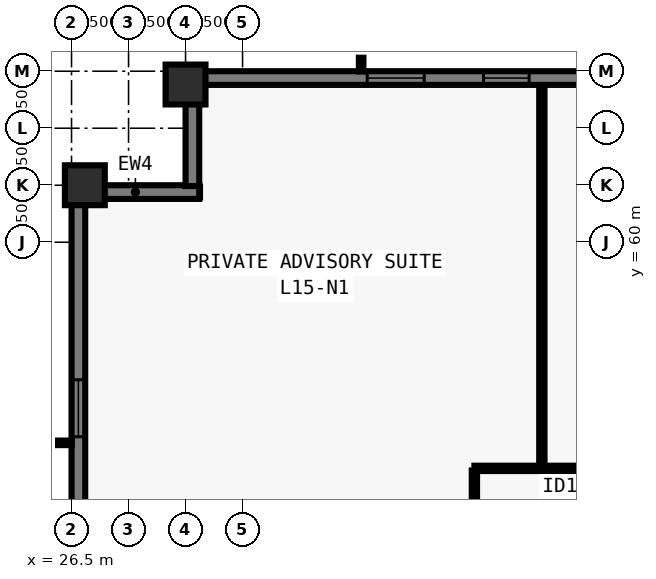
"""IFC4 building model, lengths in metres.
Left out: names, types, materials, properties, quantities, classifications, styles, units other than length and angle.
Written with IfcOpenShell. Run it as: python <this file> out.ifc"""

import sys

from ifc_helpers import new_model, si_unit, direction, frame, frame_2d, origin, origin_2d, place, context, subcontext, project, spatial, rectangle, extrude, element, fill, save


model = new_model("IFC4")
c1 = context("Model", 3, precision=1e-05, world=origin(), true_north=direction((0.0, 1.0)))
c2 = subcontext(c1, "Body", "Model", "MODEL_VIEW")
j1 = project(units=[si_unit("LENGTHUNIT", "METRE"), si_unit("PLANEANGLEUNIT", "RADIAN")], contexts=[c1])
p1 = place(None, origin())
s1 = spatial("IfcSite", under=j1, at=p1, CompositionType="ELEMENT")
p2 = place(p1, origin())
s2 = spatial("IfcBuilding", under=s1, at=p2, CompositionType="ELEMENT")
p3 = place(p2, frame((0.0, 0.0, 58.5)))
s3 = spatial("IfcBuildingStorey", under=s2, at=p3, CompositionType="ELEMENT", Elevation=58.5)
for number, where, z_axis, x_axis in (
    (1, (29.5, 64.15, 0.0), (0.0, 0.0, 1.0), (1.0, 0.0, 0.0)),
    (2, (26.85, 61.5, 0.0), (0.0, 0.0, 1.0), (0.0, 1.0, 0.0)),
):
    element("IfcColumn", number, at=place(p3, frame(where, z_axis=z_axis, x_axis=x_axis)), inside=s3, PredefinedType="COLUMN", context=c2, shape_type="SweptSolid", body=[
        extrude(rectangle(XDim=1.05, YDim=1.05, at=origin_2d()), origin(), (0.0, 0.0, 1.0), 3.5),
    ])
p4 = place(p3, frame((26.68, 16.5, 0.0), z_axis=(0.0, 0.0, 1.0), x_axis=(0.0, 1.0, 0.0)))
e3 = element("IfcWall", 3, at=p4, inside=s3, PredefinedType="SOLIDWALL", context=c2, shape_type="SweptSolid", body=[
    extrude(rectangle(XDim=44.662, YDim=0.36, at=frame_2d((22.331, 0.0))), origin(), (0.0, 0.0, 1.0), 3.28),
])
p5 = place(p4, frame((4.78, 0.0, 0.8)))
e4 = element("IfcOpeningElement", 4, at=p5, cuts=e3, PredefinedType="OPENING", context=c2, shape_type="SweptSolid", body=[
    extrude(rectangle(XDim=1.5, YDim=1.544, at=frame_2d((0.75, 0.772))), frame((0.0, 0.19, 0.0), z_axis=(0.0, -1.0, 0.0), x_axis=(1.0, 0.0, 0.0)), (0.0, 0.0, 1.0), 0.38),
])
p6 = place(p4, frame((8.29, 0.0, 0.8)))
e5 = element("IfcOpeningElement", 5, at=p6, cuts=e3, PredefinedType="OPENING", context=c2, shape_type="SweptSolid", body=[
    extrude(rectangle(XDim=1.2, YDim=1.544, at=frame_2d((0.6, 0.772))), frame((0.0, 0.19, 0.0), z_axis=(0.0, -1.0, 0.0), x_axis=(1.0, 0.0, 0.0)), (0.0, 0.0, 1.0), 0.38),
])
p7 = place(p4, frame((11.5, 0.0, 0.8)))
e6 = element("IfcOpeningElement", 6, at=p7, cuts=e3, PredefinedType="OPENING", context=c2, shape_type="SweptSolid", body=[
    extrude(rectangle(XDim=1.5, YDim=1.544, at=frame_2d((0.75, 0.772))), frame((0.0, 0.19, 0.0), z_axis=(0.0, -1.0, 0.0), x_axis=(1.0, 0.0, 0.0)), (0.0, 0.0, 1.0), 0.38),
])
p8 = place(p4, frame((15.01, 0.0, 0.8)))
e7 = element("IfcOpeningElement", 7, at=p8, cuts=e3, PredefinedType="OPENING", context=c2, shape_type="SweptSolid", body=[
    extrude(rectangle(XDim=1.2, YDim=1.544, at=frame_2d((0.6, 0.772))), frame((0.0, 0.19, 0.0), z_axis=(0.0, -1.0, 0.0), x_axis=(1.0, 0.0, 0.0)), (0.0, 0.0, 1.0), 0.38),
])
p9 = place(p4, frame((21.731, 0.0, 0.8)))
e8 = element("IfcOpeningElement", 8, at=p9, cuts=e3, PredefinedType="OPENING", context=c2, shape_type="SweptSolid", body=[
    extrude(rectangle(XDim=1.2, YDim=1.544, at=frame_2d((0.6, 0.772))), frame((0.0, 0.19, 0.0), z_axis=(0.0, -1.0, 0.0), x_axis=(1.0, 0.0, 0.0)), (0.0, 0.0, 1.0), 0.38),
])
p10 = place(p4, frame((24.091, 0.0, 0.8)))
e9 = element("IfcOpeningElement", 9, at=p10, cuts=e3, PredefinedType="OPENING", context=c2, shape_type="SweptSolid", body=[
    extrude(rectangle(XDim=1.5, YDim=1.544, at=frame_2d((0.75, 0.772))), frame((0.0, 0.19, 0.0), z_axis=(0.0, -1.0, 0.0), x_axis=(1.0, 0.0, 0.0)), (0.0, 0.0, 1.0), 0.38),
])
p11 = place(p4, frame((28.451, 0.0, 0.8)))
e10 = element("IfcOpeningElement", 10, at=p11, cuts=e3, PredefinedType="OPENING", context=c2, shape_type="SweptSolid", body=[
    extrude(rectangle(XDim=1.2, YDim=1.544, at=frame_2d((0.6, 0.772))), frame((0.0, 0.19, 0.0), z_axis=(0.0, -1.0, 0.0), x_axis=(1.0, 0.0, 0.0)), (0.0, 0.0, 1.0), 0.38),
])
p12 = place(p4, frame((31.662, 0.0, 0.8)))
e11 = element("IfcOpeningElement", 11, at=p12, cuts=e3, PredefinedType="OPENING", context=c2, shape_type="SweptSolid", body=[
    extrude(rectangle(XDim=1.5, YDim=1.544, at=frame_2d((0.75, 0.772))), frame((0.0, 0.19, 0.0), z_axis=(0.0, -1.0, 0.0), x_axis=(1.0, 0.0, 0.0)), (0.0, 0.0, 1.0), 0.38),
])
p13 = place(p4, frame((35.172, 0.0, 0.8)))
e12 = element("IfcOpeningElement", 12, at=p13, cuts=e3, PredefinedType="OPENING", context=c2, shape_type="SweptSolid", body=[
    extrude(rectangle(XDim=1.2, YDim=1.544, at=frame_2d((0.6, 0.772))), frame((0.0, 0.19, 0.0), z_axis=(0.0, -1.0, 0.0), x_axis=(1.0, 0.0, 0.0)), (0.0, 0.0, 1.0), 0.38),
])
p14 = place(p4, frame((38.382, 0.0, 0.8)))
e13 = element("IfcOpeningElement", 13, at=p14, cuts=e3, PredefinedType="OPENING", context=c2, shape_type="SweptSolid", body=[
    extrude(rectangle(XDim=1.5, YDim=1.544, at=frame_2d((0.75, 0.772))), frame((0.0, 0.19, 0.0), z_axis=(0.0, -1.0, 0.0), x_axis=(1.0, 0.0, 0.0)), (0.0, 0.0, 1.0), 0.38),
])
p15 = place(p3, frame((26.5, 61.32, 0.0), z_axis=(0.0, 0.0, 1.0), x_axis=(1.0, 0.0, 0.0)))
e14 = element("IfcWall", 14, at=p15, inside=s3, PredefinedType="SOLIDWALL", context=c2, shape_type="SweptSolid", body=[
    extrude(rectangle(XDim=3.36, YDim=0.36, at=frame_2d((1.68, 0.0))), origin(), (0.0, 0.0, 1.0), 3.28),
])
p16 = place(p3, frame((29.68, 61.478, 0.0), z_axis=(0.0, 0.0, 1.0), x_axis=(0.0, 1.0, 0.0)))
e15 = element("IfcWall", 15, at=p16, inside=s3, PredefinedType="SOLIDWALL", context=c2, shape_type="SweptSolid", body=[
    extrude(rectangle(XDim=2.684, YDim=0.36, at=frame_2d((1.342, 0.0))), origin(), (0.0, 0.0, 1.0), 3.28),
])
p17 = place(p3, frame((29.5, 64.32, 0.0), z_axis=(0.0, 0.0, 1.0), x_axis=(1.0, 0.0, 0.0)))
e16 = element("IfcWall", 16, at=p17, inside=s3, PredefinedType="SOLIDWALL", context=c2, shape_type="SweptSolid", body=[
    extrude(rectangle(XDim=44.662, YDim=0.36, at=frame_2d((22.331, 0.0))), origin(), (0.0, 0.0, 1.0), 3.28),
])
p18 = place(p17, frame((4.78, 0.0, 0.8)))
e17 = element("IfcOpeningElement", 17, at=p18, cuts=e16, PredefinedType="OPENING", context=c2, shape_type="SweptSolid", body=[
    extrude(rectangle(XDim=1.5, YDim=1.544, at=frame_2d((0.75, 0.772))), frame((0.0, 0.19, 0.0), z_axis=(0.0, -1.0, 0.0), x_axis=(1.0, 0.0, 0.0)), (0.0, 0.0, 1.0), 0.38),
])
p19 = place(p17, frame((7.84, 0.0, 0.8)))
e18 = element("IfcOpeningElement", 18, at=p19, cuts=e16, PredefinedType="OPENING", context=c2, shape_type="SweptSolid", body=[
    extrude(rectangle(XDim=1.2, YDim=1.544, at=frame_2d((0.6, 0.772))), frame((0.0, 0.19, 0.0), z_axis=(0.0, -1.0, 0.0), x_axis=(1.0, 0.0, 0.0)), (0.0, 0.0, 1.0), 0.38),
])
p20 = place(p17, frame((11.5, 0.0, 0.8)))
e19 = element("IfcOpeningElement", 19, at=p20, cuts=e16, PredefinedType="OPENING", context=c2, shape_type="SweptSolid", body=[
    extrude(rectangle(XDim=1.5, YDim=1.544, at=frame_2d((0.75, 0.772))), frame((0.0, 0.19, 0.0), z_axis=(0.0, -1.0, 0.0), x_axis=(1.0, 0.0, 0.0)), (0.0, 0.0, 1.0), 0.38),
])
p21 = place(p17, frame((15.01, 0.0, 0.8)))
e20 = element("IfcOpeningElement", 20, at=p21, cuts=e16, PredefinedType="OPENING", context=c2, shape_type="SweptSolid", body=[
    extrude(rectangle(XDim=1.2, YDim=1.544, at=frame_2d((0.6, 0.772))), frame((0.0, 0.19, 0.0), z_axis=(0.0, -1.0, 0.0), x_axis=(1.0, 0.0, 0.0)), (0.0, 0.0, 1.0), 0.38),
])
p22 = place(p17, frame((18.671, 0.0, 0.8)))
e21 = element("IfcOpeningElement", 21, at=p22, cuts=e16, PredefinedType="OPENING", context=c2, shape_type="SweptSolid", body=[
    extrude(rectangle(XDim=1.5, YDim=1.544, at=frame_2d((0.75, 0.772))), frame((0.0, 0.19, 0.0), z_axis=(0.0, -1.0, 0.0), x_axis=(1.0, 0.0, 0.0)), (0.0, 0.0, 1.0), 0.38),
])
p23 = place(p17, frame((21.281, 0.0, 0.8)))
e22 = element("IfcOpeningElement", 22, at=p23, cuts=e16, PredefinedType="OPENING", context=c2, shape_type="SweptSolid", body=[
    extrude(rectangle(XDim=1.2, YDim=1.544, at=frame_2d((0.6, 0.772))), frame((0.0, 0.19, 0.0), z_axis=(0.0, -1.0, 0.0), x_axis=(1.0, 0.0, 0.0)), (0.0, 0.0, 1.0), 0.38),
])
p24 = place(p17, frame((24.941, 0.0, 0.8)))
e23 = element("IfcOpeningElement", 23, at=p24, cuts=e16, PredefinedType="OPENING", context=c2, shape_type="SweptSolid", body=[
    extrude(rectangle(XDim=1.5, YDim=1.544, at=frame_2d((0.75, 0.772))), frame((0.0, 0.19, 0.0), z_axis=(0.0, -1.0, 0.0), x_axis=(1.0, 0.0, 0.0)), (0.0, 0.0, 1.0), 0.38),
])
p25 = place(p17, frame((28.451, 0.0, 0.8)))
e24 = element("IfcOpeningElement", 24, at=p25, cuts=e16, PredefinedType="OPENING", context=c2, shape_type="SweptSolid", body=[
    extrude(rectangle(XDim=1.2, YDim=1.544, at=frame_2d((0.6, 0.772))), frame((0.0, 0.19, 0.0), z_axis=(0.0, -1.0, 0.0), x_axis=(1.0, 0.0, 0.0)), (0.0, 0.0, 1.0), 0.38),
])
p26 = place(p17, frame((31.662, 0.0, 0.8)))
e25 = element("IfcOpeningElement", 25, at=p26, cuts=e16, PredefinedType="OPENING", context=c2, shape_type="SweptSolid", body=[
    extrude(rectangle(XDim=1.5, YDim=1.544, at=frame_2d((0.75, 0.772))), frame((0.0, 0.19, 0.0), z_axis=(0.0, -1.0, 0.0), x_axis=(1.0, 0.0, 0.0)), (0.0, 0.0, 1.0), 0.38),
])
p27 = place(p17, frame((35.172, 0.0, 0.8)))
e26 = element("IfcOpeningElement", 26, at=p27, cuts=e16, PredefinedType="OPENING", context=c2, shape_type="SweptSolid", body=[
    extrude(rectangle(XDim=1.2, YDim=1.544, at=frame_2d((0.6, 0.772))), frame((0.0, 0.19, 0.0), z_axis=(0.0, -1.0, 0.0), x_axis=(1.0, 0.0, 0.0)), (0.0, 0.0, 1.0), 0.38),
])
p28 = place(p17, frame((38.382, 0.0, 0.8)))
e27 = element("IfcOpeningElement", 27, at=p28, cuts=e16, PredefinedType="OPENING", context=c2, shape_type="SweptSolid", body=[
    extrude(rectangle(XDim=1.5, YDim=1.544, at=frame_2d((0.75, 0.772))), frame((0.0, 0.19, 0.0), z_axis=(0.0, -1.0, 0.0), x_axis=(1.0, 0.0, 0.0)), (0.0, 0.0, 1.0), 0.38),
])
p29 = place(p3, frame((37.1, 54.05, 0.0), z_axis=(0.0, 0.0, 1.0), x_axis=(1.0, 0.0, 0.0)))
e28 = element("IfcWall", 28, at=p29, inside=s3, PredefinedType="PARTITIONING", context=c2, shape_type="SweptSolid", body=[
    extrude(rectangle(XDim=29.8, YDim=0.14, at=frame_2d((14.9, 0.0))), origin(), (0.0, 0.0, 1.0), 3.28),
])
p30 = place(p29, frame((3.522, 0.0, 0.0)))
e29 = element("IfcOpeningElement", 29, at=p30, cuts=e28, PredefinedType="OPENING", context=c2, shape_type="SweptSolid", body=[
    extrude(rectangle(XDim=0.96, YDim=2.12, at=frame_2d((0.48, 1.06))), frame((0.0, 0.08, 0.0), z_axis=(0.0, -1.0, 0.0), x_axis=(1.0, 0.0, 0.0)), (0.0, 0.0, 1.0), 0.16),
])
p31 = place(p29, frame((8.06, 0.0, 0.0)))
e30 = element("IfcOpeningElement", 30, at=p31, cuts=e28, PredefinedType="OPENING", context=c2, shape_type="SweptSolid", body=[
    extrude(rectangle(XDim=0.96, YDim=2.12, at=frame_2d((0.48, 1.06))), frame((0.0, 0.08, 0.0), z_axis=(0.0, -1.0, 0.0), x_axis=(1.0, 0.0, 0.0)), (0.0, 0.0, 1.0), 0.16),
])
p32 = place(p29, frame((20.6, 0.0, 0.0)))
e31 = element("IfcOpeningElement", 31, at=p32, cuts=e28, PredefinedType="OPENING", context=c2, shape_type="SweptSolid", body=[
    extrude(rectangle(XDim=0.96, YDim=2.12, at=frame_2d((0.48, 1.06))), frame((0.0, 0.08, 0.0), z_axis=(0.0, -1.0, 0.0), x_axis=(1.0, 0.0, 0.0)), (0.0, 0.0, 1.0), 0.16),
])
p33 = place(p29, frame((28.48, 0.0, 0.0)))
e32 = element("IfcOpeningElement", 32, at=p33, cuts=e28, PredefinedType="OPENING", context=c2, shape_type="SweptSolid", body=[
    extrude(rectangle(XDim=0.96, YDim=2.12, at=frame_2d((0.48, 1.06))), frame((0.0, 0.08, 0.0), z_axis=(0.0, -1.0, 0.0), x_axis=(1.0, 0.0, 0.0)), (0.0, 0.0, 1.0), 0.16),
])
p34 = place(p3, frame((37.1, 24.005, 0.0), z_axis=(0.0, 0.0, 1.0), x_axis=(0.0, 1.0, 0.0)))
e33 = element("IfcWall", 33, at=p34, inside=s3, PredefinedType="PARTITIONING", context=c2, shape_type="SweptSolid", body=[
    extrude(rectangle(XDim=29.99, YDim=0.14, at=frame_2d((14.995, 0.0))), origin(), (0.0, 0.0, 1.0), 3.28),
])
p35 = place(p34, frame((2.76, 0.0, 0.0)))
e34 = element("IfcOpeningElement", 34, at=p35, cuts=e33, PredefinedType="OPENING", context=c2, shape_type="SweptSolid", body=[
    extrude(rectangle(XDim=0.96, YDim=2.12, at=frame_2d((0.48, 1.06))), frame((0.0, 0.08, 0.0), z_axis=(0.0, -1.0, 0.0), x_axis=(1.0, 0.0, 0.0)), (0.0, 0.0, 1.0), 0.16),
])
p36 = place(p34, frame((8.598, 0.0, 0.0)))
e35 = element("IfcOpeningElement", 35, at=p36, cuts=e33, PredefinedType="OPENING", context=c2, shape_type="SweptSolid", body=[
    extrude(rectangle(XDim=0.96, YDim=2.12, at=frame_2d((0.48, 1.06))), frame((0.0, 0.08, 0.0), z_axis=(0.0, -1.0, 0.0), x_axis=(1.0, 0.0, 0.0)), (0.0, 0.0, 1.0), 0.16),
])
p37 = place(p34, frame((14.578, 0.0, 0.0)))
e36 = element("IfcOpeningElement", 36, at=p37, cuts=e33, PredefinedType="OPENING", context=c2, shape_type="SweptSolid", body=[
    extrude(rectangle(XDim=0.96, YDim=2.12, at=frame_2d((0.48, 1.06))), frame((0.0, 0.08, 0.0), z_axis=(0.0, -1.0, 0.0), x_axis=(1.0, 0.0, 0.0)), (0.0, 0.0, 1.0), 0.16),
])
p38 = place(p34, frame((20.558, 0.0, 0.0)))
e37 = element("IfcOpeningElement", 37, at=p38, cuts=e33, PredefinedType="OPENING", context=c2, shape_type="SweptSolid", body=[
    extrude(rectangle(XDim=0.96, YDim=2.12, at=frame_2d((0.48, 1.06))), frame((0.0, 0.08, 0.0), z_axis=(0.0, -1.0, 0.0), x_axis=(1.0, 0.0, 0.0)), (0.0, 0.0, 1.0), 0.16),
])
p39 = place(p34, frame((26.333, 0.0, 0.0)))
e38 = element("IfcOpeningElement", 38, at=p39, cuts=e33, PredefinedType="OPENING", context=c2, shape_type="SweptSolid", body=[
    extrude(rectangle(XDim=0.96, YDim=2.12, at=frame_2d((0.48, 1.06))), frame((0.0, 0.08, 0.0), z_axis=(0.0, -1.0, 0.0), x_axis=(1.0, 0.0, 0.0)), (0.0, 0.0, 1.0), 0.16),
])
p40 = place(p3, frame((38.875, 54.15, 0.0), z_axis=(0.0, 0.0, 1.0), x_axis=(0.0, 1.0, 0.0)))
e39 = element("IfcWall", 39, at=p40, inside=s3, PredefinedType="PARTITIONING", context=c2, shape_type="SweptSolid", body=[
    extrude(rectangle(XDim=9.93, YDim=0.14, at=frame_2d((4.965, 0.0))), origin(), (0.0, 0.0, 1.0), 3.28),
])
p41 = place(p14, origin())
e40 = element("IfcWindow", 40, at=p41, inside=s3, PartitioningType="SINGLE_PANEL", PredefinedType="WINDOW", context=c2, shape_type="SweptSolid", body=[
    extrude(rectangle(XDim=1.5, YDim=1.544, at=frame_2d((0.75, 0.772))), frame((0.0, -0.05, 0.0), z_axis=(0.0, -1.0, 0.0), x_axis=(1.0, 0.0, 0.0)), (0.0, 0.0, 1.0), 0.06),
])
fill(e13, e40)
p42 = place(p18, origin())
e41 = element("IfcWindow", 41, at=p42, inside=s3, PartitioningType="SINGLE_PANEL", PredefinedType="WINDOW", context=c2, shape_type="SweptSolid", body=[
    extrude(rectangle(XDim=1.5, YDim=1.544, at=frame_2d((0.75, 0.772))), frame((0.0, -0.05, 0.0), z_axis=(0.0, -1.0, 0.0), x_axis=(1.0, 0.0, 0.0)), (0.0, 0.0, 1.0), 0.06),
])
fill(e17, e41)
p43 = place(p19, origin())
e42 = element("IfcWindow", 42, at=p43, inside=s3, PartitioningType="SINGLE_PANEL", PredefinedType="WINDOW", context=c2, shape_type="SweptSolid", body=[
    extrude(rectangle(XDim=1.2, YDim=1.544, at=frame_2d((0.6, 0.772))), frame((0.0, -0.05, 0.0), z_axis=(0.0, -1.0, 0.0), x_axis=(1.0, 0.0, 0.0)), (0.0, 0.0, 1.0), 0.06),
])
fill(e18, e42)
save(model, sys.argv[1])
